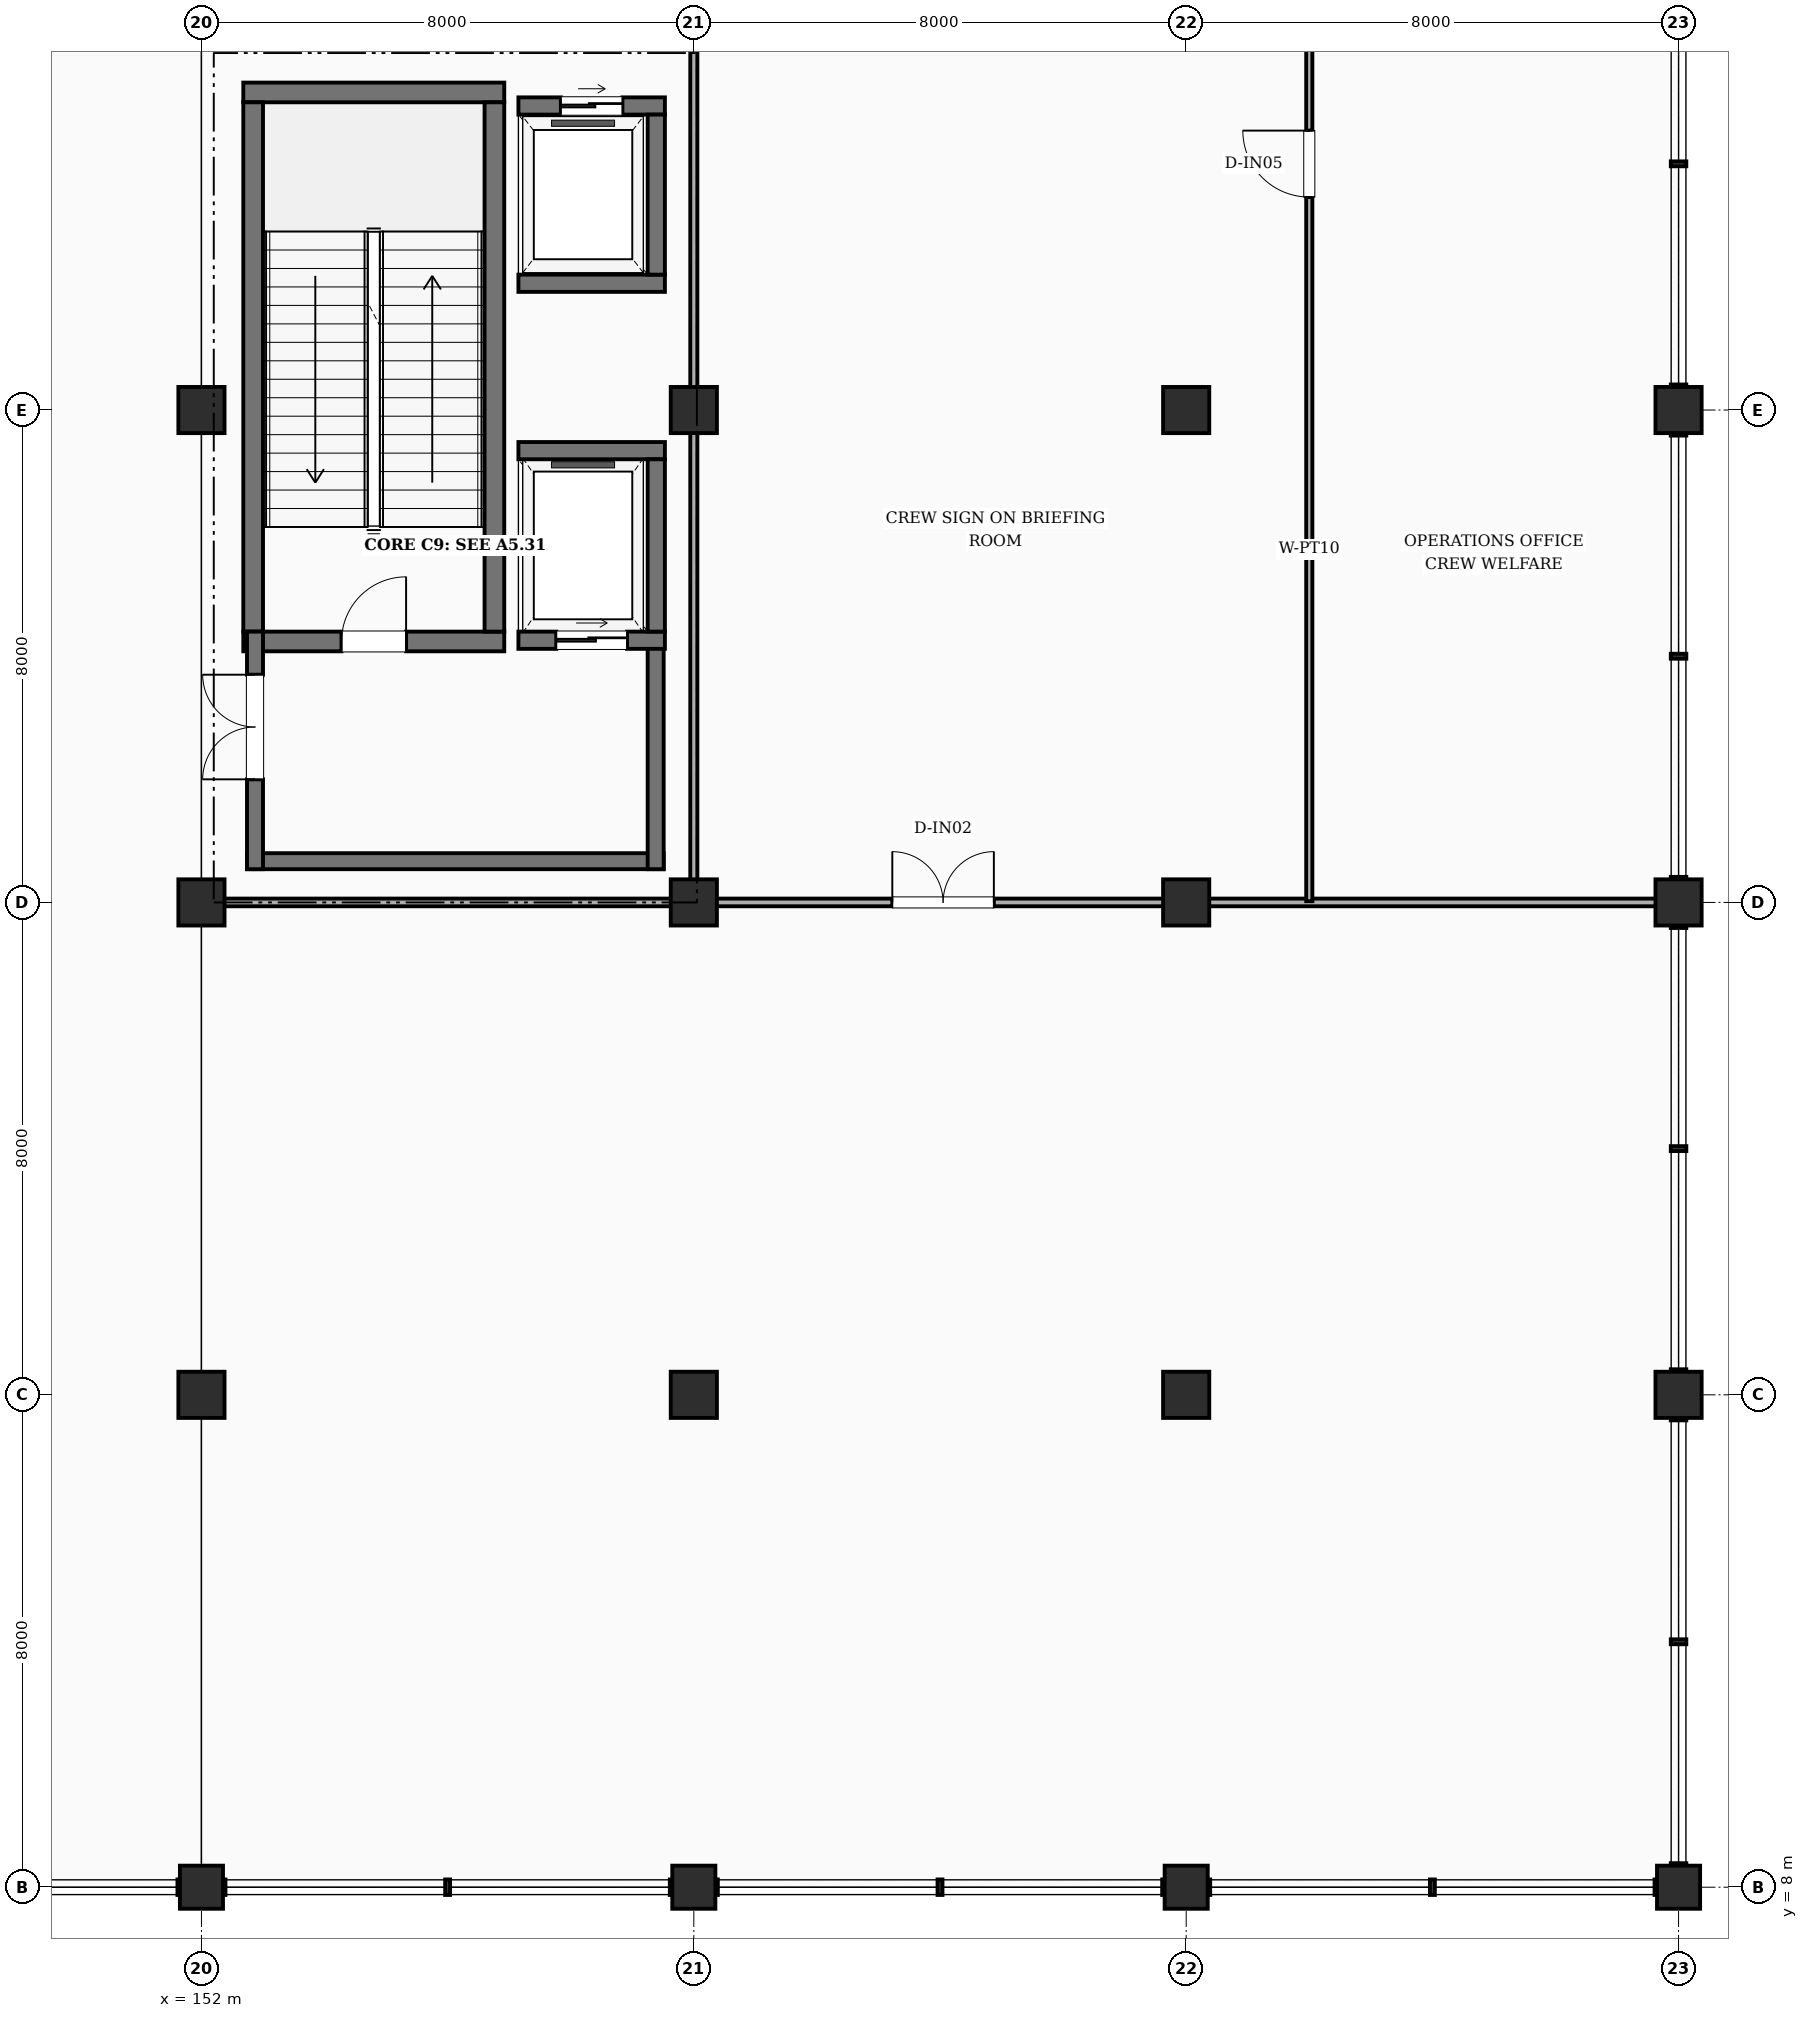
"""IFC4 building model, lengths in metres.
Left out: names, types, materials, properties, quantities, classifications, styles, units other than length and angle.
Written with IfcOpenShell. Run it as: python <this file> out.ifc"""

import sys

from ifc_helpers import new_model, si_unit, direction, frame, frame_2d, origin, origin_2d, place, context, subcontext, project, spatial, rectangle, extrude, element, fill, save


model = new_model("IFC4")
c1 = context("Model", 3, precision=1e-05, world=origin(), true_north=direction((0.0, 1.0)))
c2 = subcontext(c1, "Body", "Model", "MODEL_VIEW")
j1 = project(units=[si_unit("LENGTHUNIT", "METRE"), si_unit("PLANEANGLEUNIT", "RADIAN")], contexts=[c1])
p1 = place(None, origin())
s1 = spatial("IfcSite", under=j1, at=p1, CompositionType="ELEMENT")
p2 = place(p1, origin())
s2 = spatial("IfcBuilding", under=s1, at=p2, CompositionType="ELEMENT")
p3 = place(p2, frame((0.0, 0.0, 5.4)))
s3 = spatial("IfcBuildingStorey", under=s2, at=p3, CompositionType="ELEMENT", Elevation=5.4)
p4 = place(p3, frame((152.0, 8.0, 0.0), z_axis=(0.0, 0.0, 1.0), x_axis=(1.0, 0.0, 0.0)))
e1 = element("IfcColumn", 1, at=p4, inside=s3, PredefinedType="COLUMN", context=c2, shape_type="SweptSolid", body=[
    extrude(rectangle(XDim=0.7, YDim=0.7, at=origin_2d()), origin(), (0.0, 0.0, 1.0), 5.4),
])
for number, where, z_axis, x_axis in (
    (2, (152.0, 16.0, 0.0), (0.0, 0.0, 1.0), (1.0, 0.0, 0.0)),
    (3, (152.0, 24.0, 0.0), (0.0, 0.0, 1.0), (1.0, 0.0, 0.0)),
    (4, (152.0, 32.0, 0.0), (0.0, 0.0, 1.0), (1.0, 0.0, 0.0)),
):
    element("IfcColumn", number, at=place(p3, frame(where, z_axis=z_axis, x_axis=x_axis)), inside=s3, PredefinedType="COLUMN", context=c2, shape_type="SweptSolid", body=[
        extrude(rectangle(XDim=0.75, YDim=0.75, at=origin_2d()), origin(), (0.0, 0.0, 1.0), 5.4),
    ])
p5 = place(p3, frame((160.0, 8.0, 0.0), z_axis=(0.0, 0.0, 1.0), x_axis=(1.0, 0.0, 0.0)))
e5 = element("IfcColumn", 5, at=p5, inside=s3, PredefinedType="COLUMN", context=c2, shape_type="SweptSolid", body=[
    extrude(rectangle(XDim=0.7, YDim=0.7, at=origin_2d()), origin(), (0.0, 0.0, 1.0), 5.4),
])
for number, where, z_axis, x_axis in (
    (6, (160.0, 16.0, 0.0), (0.0, 0.0, 1.0), (1.0, 0.0, 0.0)),
    (7, (160.0, 24.0, 0.0), (0.0, 0.0, 1.0), (1.0, 0.0, 0.0)),
    (8, (160.0, 32.0, 0.0), (0.0, 0.0, 1.0), (1.0, 0.0, 0.0)),
):
    element("IfcColumn", number, at=place(p3, frame(where, z_axis=z_axis, x_axis=x_axis)), inside=s3, PredefinedType="COLUMN", context=c2, shape_type="SweptSolid", body=[
        extrude(rectangle(XDim=0.75, YDim=0.75, at=origin_2d()), origin(), (0.0, 0.0, 1.0), 5.4),
    ])
p6 = place(p3, frame((168.0, 8.0, 0.0), z_axis=(0.0, 0.0, 1.0), x_axis=(1.0, 0.0, 0.0)))
e9 = element("IfcColumn", 9, at=p6, inside=s3, PredefinedType="COLUMN", context=c2, shape_type="SweptSolid", body=[
    extrude(rectangle(XDim=0.7, YDim=0.7, at=origin_2d()), origin(), (0.0, 0.0, 1.0), 5.4),
])
for number, where, z_axis, x_axis in (
    (10, (168.0, 16.0, 0.0), (0.0, 0.0, 1.0), (1.0, 0.0, 0.0)),
    (11, (168.0, 24.0, 0.0), (0.0, 0.0, 1.0), (1.0, 0.0, 0.0)),
    (12, (168.0, 32.0, 0.0), (0.0, 0.0, 1.0), (1.0, 0.0, 0.0)),
):
    element("IfcColumn", number, at=place(p3, frame(where, z_axis=z_axis, x_axis=x_axis)), inside=s3, PredefinedType="COLUMN", context=c2, shape_type="SweptSolid", body=[
        extrude(rectangle(XDim=0.75, YDim=0.75, at=origin_2d()), origin(), (0.0, 0.0, 1.0), 5.4),
    ])
p7 = place(p3, frame((176.0, 8.0, 0.0), z_axis=(0.0, 0.0, 1.0), x_axis=(1.0, 0.0, 0.0)))
e13 = element("IfcColumn", 13, at=p7, inside=s3, PredefinedType="COLUMN", context=c2, shape_type="SweptSolid", body=[
    extrude(rectangle(XDim=0.7, YDim=0.7, at=origin_2d()), origin(), (0.0, 0.0, 1.0), 5.4),
])
for number, where, z_axis, x_axis in (
    (14, (176.0, 16.0, 0.0), (0.0, 0.0, 1.0), (1.0, 0.0, 0.0)),
    (15, (176.0, 24.0, 0.0), (0.0, 0.0, 1.0), (1.0, 0.0, 0.0)),
    (16, (176.0, 32.0, 0.0), (0.0, 0.0, 1.0), (1.0, 0.0, 0.0)),
):
    element("IfcColumn", number, at=place(p3, frame(where, z_axis=z_axis, x_axis=x_axis)), inside=s3, PredefinedType="COLUMN", context=c2, shape_type="SweptSolid", body=[
        extrude(rectangle(XDim=0.75, YDim=0.75, at=origin_2d()), origin(), (0.0, 0.0, 1.0), 5.4),
    ])
p8 = place(p3, frame((152.68, 28.24, 0.0), z_axis=(0.0, 0.0, 1.0), x_axis=(1.0, 0.0, 0.0)))
e17 = element("IfcWall", 17, at=p8, inside=s3, PredefinedType="SHEAR", context=c2, shape_type="SweptSolid", body=[
    extrude(rectangle(XDim=4.24, YDim=0.32, at=frame_2d((2.12, 0.0))), origin(), (0.0, 0.0, 1.0), 5.4),
])
p9 = place(p8, frame((1.595, 0.0, 0.0)))
e18 = element("IfcOpeningElement", 18, at=p9, cuts=e17, PredefinedType="OPENING", context=c2, shape_type="SweptSolid", body=[
    extrude(rectangle(XDim=1.05, YDim=2.15, at=frame_2d((0.525, 1.075))), frame((0.0, 0.17, 0.0), z_axis=(0.0, -1.0, 0.0), x_axis=(1.0, 0.0, 0.0)), (0.0, 0.0, 1.0), 0.34),
])
p10 = place(p3, frame((152.68, 37.16, 0.0), z_axis=(0.0, 0.0, 1.0), x_axis=(1.0, 0.0, 0.0)))
e19 = element("IfcWall", 19, at=p10, inside=s3, PredefinedType="SHEAR", context=c2, shape_type="SweptSolid", body=[
    extrude(rectangle(XDim=4.24, YDim=0.32, at=frame_2d((2.12, 0.0))), origin(), (0.0, 0.0, 1.0), 5.4),
])
for number, where, z_axis, x_axis in (
    (20, (152.84, 28.4, 0.0), (0.0, 0.0, 1.0), (0.0, 1.0, 0.0)),
    (21, (156.76, 28.4, 0.0), (0.0, 0.0, 1.0), (0.0, 1.0, 0.0)),
):
    element("IfcWall", number, at=place(p3, frame(where, z_axis=z_axis, x_axis=x_axis)), inside=s3, PredefinedType="SHEAR", context=c2, shape_type="SweptSolid", body=[
        extrude(rectangle(XDim=8.6, YDim=0.32, at=frame_2d((4.3, 0.0))), origin(), (0.0, 0.0, 1.0), 5.4),
    ])
p11 = place(p3, frame((159.51, 24.67, 0.0), z_axis=(0.0, 0.0, 1.0), x_axis=(-1.0, 0.0, 0.0)))
e22 = element("IfcWall", 22, at=p11, inside=s3, PredefinedType="SHEAR", context=c2, shape_type="SweptSolid", body=[
    extrude(rectangle(XDim=6.77, YDim=0.26, at=frame_2d((3.385, 0.0))), origin(), (0.0, 0.0, 1.0), 5.4),
])
p12 = place(p3, frame((152.87, 24.54, 0.0), z_axis=(0.0, 0.0, 1.0), x_axis=(0.0, 1.0, 0.0)))
e23 = element("IfcWall", 23, at=p12, inside=s3, PredefinedType="SHEAR", context=c2, shape_type="SweptSolid", body=[
    extrude(rectangle(XDim=3.86, YDim=0.26, at=frame_2d((1.93, 0.0))), origin(), (0.0, 0.0, 1.0), 5.4),
])
p13 = place(p12, frame((1.46, 0.0, 0.0)))
e24 = element("IfcOpeningElement", 24, at=p13, cuts=e23, PredefinedType="OPENING", context=c2, shape_type="SweptSolid", body=[
    extrude(rectangle(XDim=1.7, YDim=2.2, at=frame_2d((0.85, 1.1))), frame((0.0, 0.14, 0.0), z_axis=(0.0, -1.0, 0.0), x_axis=(1.0, 0.0, 0.0)), (0.0, 0.0, 1.0), 0.28),
])
p14 = place(p3, frame((159.38, 24.54, 0.0), z_axis=(0.0, 0.0, 1.0), x_axis=(0.0, 1.0, 0.0)))
e25 = element("IfcWall", 25, at=p14, inside=s3, PredefinedType="SHEAR", context=c2, shape_type="SweptSolid", body=[
    extrude(rectangle(XDim=3.86, YDim=0.26, at=frame_2d((1.93, 0.0))), origin(), (0.0, 0.0, 1.0), 5.4),
])
p15 = place(p3, frame((157.15, 28.26, 0.0), z_axis=(0.0, 0.0, 1.0), x_axis=(1.0, 0.0, 0.0)))
e26 = element("IfcWall", 26, at=p15, inside=s3, PredefinedType="SHEAR", context=c2, shape_type="SweptSolid", body=[
    extrude(rectangle(XDim=2.38, YDim=0.28, at=frame_2d((1.19, 0.0))), origin(), (0.0, 0.0, 1.0), 5.4),
])
p16 = place(p15, frame((0.615, 0.0, 0.0)))
e27 = element("IfcOpeningElement", 27, at=p16, cuts=e26, PredefinedType="OPENING", context=c2, shape_type="SweptSolid", body=[
    extrude(rectangle(XDim=1.15, YDim=2.2, at=frame_2d((0.575, 1.1))), frame((0.0, 0.15, 0.0), z_axis=(0.0, -1.0, 0.0), x_axis=(1.0, 0.0, 0.0)), (0.0, 0.0, 1.0), 0.3),
])
p17 = place(p3, frame((157.15, 31.34, 0.0), z_axis=(0.0, 0.0, 1.0), x_axis=(1.0, 0.0, 0.0)))
e28 = element("IfcWall", 28, at=p17, inside=s3, PredefinedType="SHEAR", context=c2, shape_type="SweptSolid", body=[
    extrude(rectangle(XDim=2.38, YDim=0.28, at=frame_2d((1.19, 0.0))), origin(), (0.0, 0.0, 1.0), 5.4),
])
p18 = place(p3, frame((159.39, 28.4, 0.0), z_axis=(0.0, 0.0, 1.0), x_axis=(0.0, 1.0, 0.0)))
e29 = element("IfcWall", 29, at=p18, inside=s3, PredefinedType="SHEAR", context=c2, shape_type="SweptSolid", body=[
    extrude(rectangle(XDim=2.8, YDim=0.28, at=frame_2d((1.4, 0.0))), origin(), (0.0, 0.0, 1.0), 5.4),
])
p19 = place(p3, frame((157.15, 34.06, 0.0), z_axis=(0.0, 0.0, 1.0), x_axis=(1.0, 0.0, 0.0)))
e30 = element("IfcWall", 30, at=p19, inside=s3, PredefinedType="SHEAR", context=c2, shape_type="SweptSolid", body=[
    extrude(rectangle(XDim=2.38, YDim=0.28, at=frame_2d((1.19, 0.0))), origin(), (0.0, 0.0, 1.0), 5.4),
])
p20 = place(p3, frame((157.15, 36.94, 0.0), z_axis=(0.0, 0.0, 1.0), x_axis=(1.0, 0.0, 0.0)))
e31 = element("IfcWall", 31, at=p20, inside=s3, PredefinedType="SHEAR", context=c2, shape_type="SweptSolid", body=[
    extrude(rectangle(XDim=2.38, YDim=0.28, at=frame_2d((1.19, 0.0))), origin(), (0.0, 0.0, 1.0), 5.4),
])
p21 = place(p20, frame((0.69, 0.0, 0.0)))
e32 = element("IfcOpeningElement", 32, at=p21, cuts=e31, PredefinedType="OPENING", context=c2, shape_type="SweptSolid", body=[
    extrude(rectangle(XDim=1.0, YDim=2.15, at=frame_2d((0.5, 1.075))), frame((0.0, 0.15, 0.0), z_axis=(0.0, -1.0, 0.0), x_axis=(1.0, 0.0, 0.0)), (0.0, 0.0, 1.0), 0.3),
])
p22 = place(p3, frame((159.39, 34.2, 0.0), z_axis=(0.0, 0.0, 1.0), x_axis=(0.0, 1.0, 0.0)))
e33 = element("IfcWall", 33, at=p22, inside=s3, PredefinedType="SHEAR", context=c2, shape_type="SweptSolid", body=[
    extrude(rectangle(XDim=2.6, YDim=0.28, at=frame_2d((1.3, 0.0))), origin(), (0.0, 0.0, 1.0), 5.4),
])
p23 = place(p3, frame((152.22, 24.0, 0.0), z_axis=(0.0, 0.0, 1.0), x_axis=(1.0, 0.0, 0.0)))
e34 = element("IfcWall", 34, at=p23, inside=s3, PredefinedType="PARTITIONING", context=c2, shape_type="SweptSolid", body=[
    extrude(rectangle(XDim=23.66, YDim=0.125, at=frame_2d((11.83, 0.0))), origin(), (0.0, 0.0, 1.0), 4.39),
])
p24 = place(p23, frame((11.005, 0.0, 0.0)))
e35 = element("IfcOpeningElement", 35, at=p24, cuts=e34, PredefinedType="OPENING", context=c2, shape_type="SweptSolid", body=[
    extrude(rectangle(XDim=1.65, YDim=2.25, at=frame_2d((0.825, 1.125))), frame((0.0, 0.073, 0.0), z_axis=(0.0, -1.0, 0.0), x_axis=(1.0, 0.0, 0.0)), (0.0, 0.0, 1.0), 0.145),
])
p25 = place(p3, frame((160.0, 24.02, 0.0), z_axis=(0.0, 0.0, 1.0), x_axis=(0.0, 1.0, 0.0)))
e36 = element("IfcWall", 36, at=p25, inside=s3, PredefinedType="PARTITIONING", context=c2, shape_type="SweptSolid", body=[
    extrude(rectangle(XDim=19.16, YDim=0.115, at=frame_2d((9.58, 0.0))), origin(), (0.0, 0.0, 1.0), 4.39),
])
p26 = place(p3, frame((170.0, 24.02, 0.0), z_axis=(0.0, 0.0, 1.0), x_axis=(0.0, 1.0, 0.0)))
e37 = element("IfcWall", 37, at=p26, inside=s3, PredefinedType="PARTITIONING", context=c2, shape_type="SweptSolid", body=[
    extrude(rectangle(XDim=23.96, YDim=0.1, at=frame_2d((11.98, 0.0))), origin(), (0.0, 0.0, 1.0), 4.39),
])
p27 = place(p26, frame((11.44, 0.0, 0.0)))
e38 = element("IfcOpeningElement", 38, at=p27, cuts=e37, PredefinedType="OPENING", context=c2, shape_type="SweptSolid", body=[
    extrude(rectangle(XDim=1.08, YDim=2.15, at=frame_2d((0.54, 1.075))), frame((0.0, 0.06, 0.0), z_axis=(0.0, -1.0, 0.0), x_axis=(1.0, 0.0, 0.0)), (0.0, 0.0, 1.0), 0.12),
])
p28 = place(p9, origin())
e39 = element("IfcDoor", 39, at=p28, inside=s3, OperationType="SINGLE_SWING_RIGHT", PredefinedType="DOOR", context=c2, shape_type="SweptSolid", body=[
    extrude(rectangle(XDim=1.05, YDim=2.15, at=frame_2d((0.525, 1.075))), frame((0.0, 0.025, 0.0), z_axis=(0.0, -1.0, 0.0), x_axis=(1.0, 0.0, 0.0)), (0.0, 0.0, 1.0), 0.05),
])
fill(e18, e39)
p29 = place(p13, origin())
e40 = element("IfcDoor", 40, at=p29, inside=s3, OperationType="DOUBLE_DOOR_SINGLE_SWING", PredefinedType="DOOR", context=c2, shape_type="SweptSolid", body=[
    extrude(rectangle(XDim=1.7, YDim=2.2, at=frame_2d((0.85, 1.1))), frame((0.0, 0.025, 0.0), z_axis=(0.0, -1.0, 0.0), x_axis=(1.0, 0.0, 0.0)), (0.0, 0.0, 1.0), 0.05),
])
fill(e24, e40)
p30 = place(p16, origin())
e41 = element("IfcDoor", 41, at=p30, inside=s3, OperationType="SLIDING_TO_LEFT", PredefinedType="DOOR", context=c2, shape_type="SweptSolid", body=[
    extrude(rectangle(XDim=1.15, YDim=2.2, at=frame_2d((0.575, 1.1))), frame((0.0, 0.025, 0.0), z_axis=(0.0, -1.0, 0.0), x_axis=(1.0, 0.0, 0.0)), (0.0, 0.0, 1.0), 0.05),
])
fill(e27, e41)
p31 = place(p21, origin())
e42 = element("IfcDoor", 42, at=p31, inside=s3, OperationType="SLIDING_TO_LEFT", PredefinedType="DOOR", context=c2, shape_type="SweptSolid", body=[
    extrude(rectangle(XDim=1.0, YDim=2.15, at=frame_2d((0.5, 1.075))), frame((0.0, 0.025, 0.0), z_axis=(0.0, -1.0, 0.0), x_axis=(1.0, 0.0, 0.0)), (0.0, 0.0, 1.0), 0.05),
])
fill(e32, e42)
p32 = place(p24, origin())
e43 = element("IfcDoor", 43, at=p32, inside=s3, OperationType="DOUBLE_DOOR_SINGLE_SWING", PredefinedType="DOOR", context=c2, shape_type="SweptSolid", body=[
    extrude(rectangle(XDim=1.65, YDim=2.25, at=frame_2d((0.825, 1.125))), frame((0.0, 0.025, 0.0), z_axis=(0.0, -1.0, 0.0), x_axis=(1.0, 0.0, 0.0)), (0.0, 0.0, 1.0), 0.05),
])
fill(e35, e43)
p33 = place(p27, origin())
e44 = element("IfcDoor", 44, at=p33, inside=s3, OperationType="SINGLE_SWING_RIGHT", PredefinedType="DOOR", context=c2, shape_type="SweptSolid", body=[
    extrude(rectangle(XDim=1.08, YDim=2.15, at=frame_2d((0.54, 1.075))), frame((0.0, 0.025, 0.0), z_axis=(0.0, -1.0, 0.0), x_axis=(1.0, 0.0, 0.0)), (0.0, 0.0, 1.0), 0.05),
])
fill(e38, e44)
save(model, sys.argv[1])
